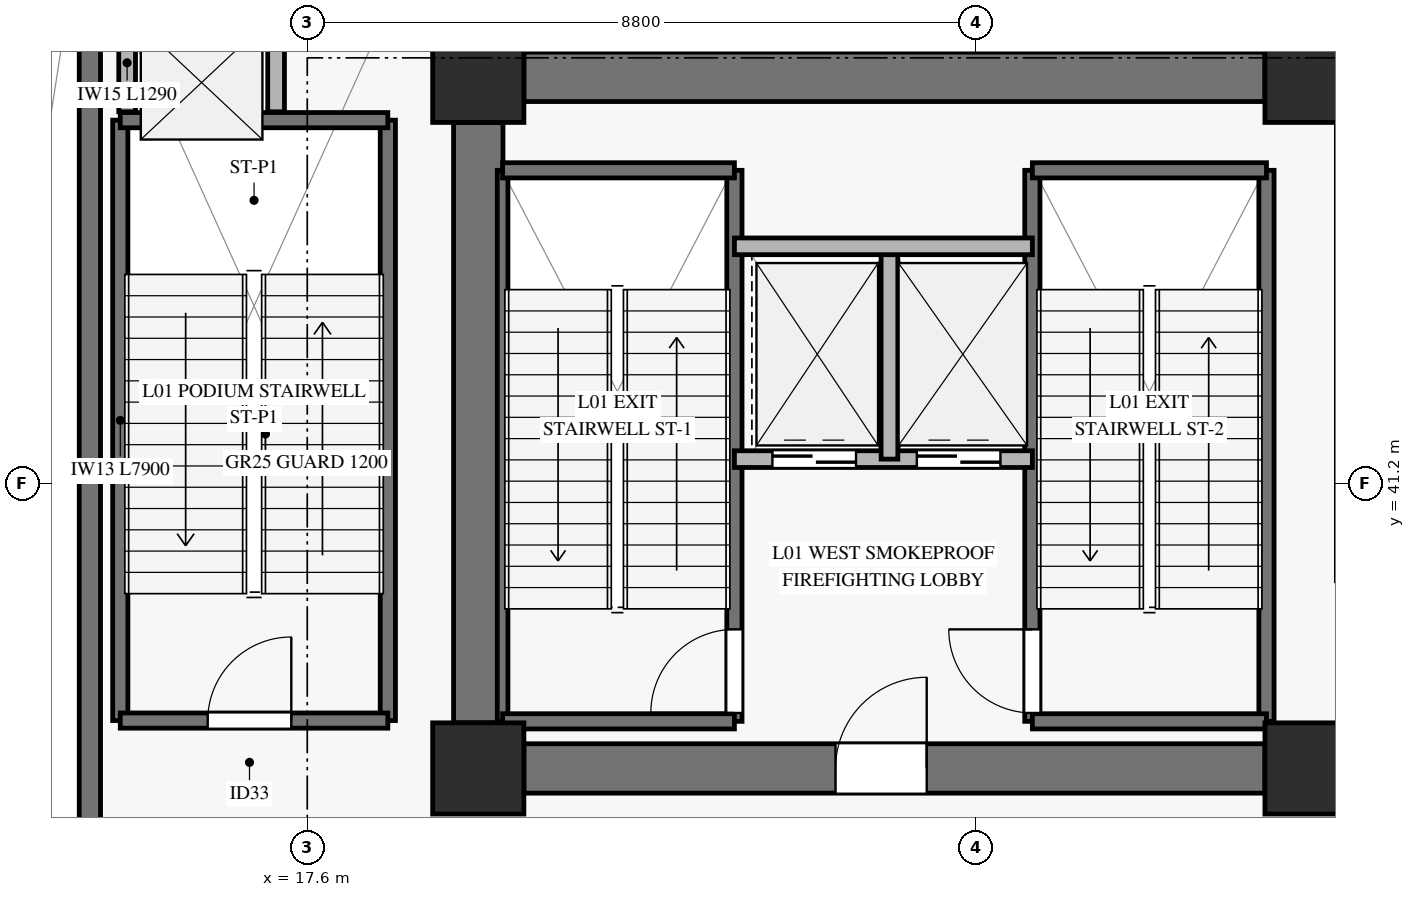
"""IFC4 building model, lengths in metres.
Left out: names, types, materials, properties, quantities, classifications, styles, units other than length and angle.
Written with IfcOpenShell. Run it as: python <this file> out.ifc"""

import sys

from ifc_helpers import new_model, si_unit, direction, frame, frame_2d, origin, origin_2d, place, context, subcontext, project, spatial, rectangle, extrude, source, transform, mapped, element, fill, save


model = new_model("IFC4")
c1 = context("Model", 3, precision=1e-05, world=origin(), true_north=direction((0.0, 1.0)))
c2 = subcontext(c1, "Body", "Model", "MODEL_VIEW")
j1 = project(units=[si_unit("LENGTHUNIT", "METRE"), si_unit("PLANEANGLEUNIT", "RADIAN")], contexts=[c1])
p1 = place(None, origin())
s1 = spatial("IfcSite", under=j1, at=p1, CompositionType="ELEMENT")
p2 = place(p1, origin())
s2 = spatial("IfcBuilding", under=s1, at=p2, CompositionType="ELEMENT")
p3 = place(p2, origin())
s3 = spatial("IfcBuildingStorey", under=s2, at=p3, CompositionType="ELEMENT", Elevation=0.0)
m1 = source(origin(), c2, "Body", "SweptSolid", [
    extrude(rectangle(XDim=1.2, YDim=1.2, at=origin_2d()), origin(), (0.0, 0.0, 1.0), 5.34),
])
for number, where, z_axis, x_axis in (
    (1, (19.85, 37.45, 0.0), (0.0, 0.0, 1.0), (1.0, 0.0, 0.0)),
    (2, (19.85, 46.55, 0.0), (0.0, 0.0, 1.0), (1.0, 0.0, 0.0)),
    (3, (30.8, 37.45, 0.0), (0.0, 0.0, 1.0), (1.0, 0.0, 0.0)),
    (4, (30.8, 46.55, 0.0), (0.0, 0.0, 1.0), (1.0, 0.0, 0.0)),
):
    element("IfcColumn", number, at=place(p3, frame(where, z_axis=z_axis, x_axis=x_axis)), inside=s3, PredefinedType="PILASTER", context=c2, shape_type="MappedRepresentation", body=[
        mapped(m1, transform((0.0, 0.0, 0.0), x_axis=(1.0, 0.0, 0.0), y_axis=(0.0, 1.0, 0.0), z_axis=(0.0, 0.0, 1.0), scale=1.0)),
    ])
p4 = place(p3, frame((20.45, 46.55, 0.0), z_axis=(0.0, 0.0, 1.0), x_axis=(1.0, 0.0, 0.0)))
e5 = element("IfcWall", 5, at=p4, inside=s3, PredefinedType="SHEAR", context=c2, shape_type="SweptSolid", body=[
    extrude(rectangle(XDim=9.75, YDim=0.65, at=frame_2d((4.875, 0.0))), origin(), (0.0, 0.0, 1.0), 5.34),
])
p5 = place(p3, frame((20.45, 37.45, 0.0), z_axis=(0.0, 0.0, 1.0), x_axis=(1.0, 0.0, 0.0)))
e6 = element("IfcWall", 6, at=p5, inside=s3, PredefinedType="SHEAR", context=c2, shape_type="SweptSolid", body=[
    extrude(rectangle(XDim=9.75, YDim=0.65, at=frame_2d((4.875, 0.0))), origin(), (0.0, 0.0, 1.0), 5.34),
])
p6 = place(p5, frame((4.1, 0.0, 0.0)))
e7 = element("IfcOpeningElement", 7, at=p6, cuts=e6, PredefinedType="OPENING", context=c2, shape_type="SweptSolid", body=[
    extrude(rectangle(XDim=1.2, YDim=2.15, at=frame_2d((0.6, 1.075))), frame((0.0, 0.335, 0.0), z_axis=(0.0, -1.0, 0.0), x_axis=(1.0, 0.0, 0.0)), (0.0, 0.0, 1.0), 0.67),
])
p7 = place(p3, frame((19.85, 38.05, 0.0), z_axis=(0.0, 0.0, 1.0), x_axis=(0.0, 1.0, 0.0)))
e8 = element("IfcWall", 8, at=p7, inside=s3, PredefinedType="SHEAR", context=c2, shape_type="SweptSolid", body=[
    extrude(rectangle(XDim=7.9, YDim=0.65, at=frame_2d((3.95, 0.0))), origin(), (0.0, 0.0, 1.0), 5.34),
])
p8 = place(p3, frame((14.74, 6.76, 0.0), z_axis=(0.0, 0.0, 1.0), x_axis=(0.0, 1.0, 0.0)))
e9 = element("IfcWall", 9, at=p8, inside=s3, PredefinedType="SOLIDWALL", context=c2, shape_type="SweptSolid", body=[
    extrude(rectangle(XDim=41.7, YDim=0.28, at=frame_2d((20.85, 0.0))), origin(), (0.0, 0.0, 1.0), 4.35),
])
p9 = place(p3, frame((20.17, 38.07, 0.0), z_axis=(0.0, 0.0, 1.0), x_axis=(0.0, 1.0, 0.0)))
e10 = element("IfcWall", 10, at=p9, inside=s3, PredefinedType="SOLIDWALL", context=c2, shape_type="SweptSolid", body=[
    extrude(rectangle(XDim=7.25, YDim=0.14, at=frame_2d((3.625, 0.0))), origin(), (0.0, 0.0, 1.0), 5.6),
])
p10 = place(p3, frame((23.22, 38.07, 0.0), z_axis=(0.0, 0.0, 1.0), x_axis=(0.0, 1.0, 0.0)))
e11 = element("IfcWall", 11, at=p10, inside=s3, PredefinedType="SOLIDWALL", context=c2, shape_type="SweptSolid", body=[
    extrude(rectangle(XDim=7.25, YDim=0.2, at=frame_2d((3.625, 0.0))), origin(), (0.0, 0.0, 1.0), 5.6),
])
p11 = place(p10, frame((0.11, 0.0, 0.0)))
e12 = element("IfcOpeningElement", 12, at=p11, cuts=e11, PredefinedType="OPENING", context=c2, shape_type="SweptSolid", body=[
    extrude(rectangle(XDim=1.1, YDim=2.15, at=frame_2d((0.55, 1.075))), frame((0.0, 0.11, 0.0), z_axis=(0.0, -1.0, 0.0), x_axis=(1.0, 0.0, 0.0)), (0.0, 0.0, 1.0), 0.22),
])
for number, where, z_axis, x_axis in (
    (13, (20.17, 45.32, 0.0), (0.0, 0.0, 1.0), (1.0, 0.0, 0.0)),
    (14, (20.17, 38.07, 0.0), (0.0, 0.0, 1.0), (1.0, 0.0, 0.0)),
):
    element("IfcWall", number, at=place(p3, frame(where, z_axis=z_axis, x_axis=x_axis)), inside=s3, PredefinedType="SOLIDWALL", context=c2, shape_type="SweptSolid", body=[
        extrude(rectangle(XDim=3.05, YDim=0.2, at=frame_2d((1.525, 0.0))), origin(), (0.0, 0.0, 1.0), 5.6),
    ])
p12 = place(p3, frame((27.14, 38.07, 0.0), z_axis=(0.0, 0.0, 1.0), x_axis=(0.0, 1.0, 0.0)))
e15 = element("IfcWall", 15, at=p12, inside=s3, PredefinedType="SOLIDWALL", context=c2, shape_type="SweptSolid", body=[
    extrude(rectangle(XDim=7.25, YDim=0.2, at=frame_2d((3.625, 0.0))), origin(), (0.0, 0.0, 1.0), 5.6),
])
p13 = place(p12, frame((0.11, 0.0, 0.0)))
e16 = element("IfcOpeningElement", 16, at=p13, cuts=e15, PredefinedType="OPENING", context=c2, shape_type="SweptSolid", body=[
    extrude(rectangle(XDim=1.1, YDim=2.15, at=frame_2d((0.55, 1.075))), frame((0.0, 0.11, 0.0), z_axis=(0.0, -1.0, 0.0), x_axis=(1.0, 0.0, 0.0)), (0.0, 0.0, 1.0), 0.22),
])
p14 = place(p3, frame((30.22, 38.07, 0.0), z_axis=(0.0, 0.0, 1.0), x_axis=(0.0, 1.0, 0.0)))
e17 = element("IfcWall", 17, at=p14, inside=s3, PredefinedType="SOLIDWALL", context=c2, shape_type="SweptSolid", body=[
    extrude(rectangle(XDim=7.25, YDim=0.2, at=frame_2d((3.625, 0.0))), origin(), (0.0, 0.0, 1.0), 5.6),
])
for number, where, z_axis, x_axis in (
    (18, (27.14, 45.32, 0.0), (0.0, 0.0, 1.0), (1.0, 0.0, 0.0)),
    (19, (27.14, 38.07, 0.0), (0.0, 0.0, 1.0), (1.0, 0.0, 0.0)),
):
    element("IfcWall", number, at=place(p3, frame(where, z_axis=z_axis, x_axis=x_axis)), inside=s3, PredefinedType="SOLIDWALL", context=c2, shape_type="SweptSolid", body=[
        extrude(rectangle(XDim=3.08, YDim=0.2, at=frame_2d((1.54, 0.0))), origin(), (0.0, 0.0, 1.0), 5.6),
    ])
p15 = place(p3, frame((23.22, 41.52, 0.0), z_axis=(0.0, 0.0, 1.0), x_axis=(1.0, 0.0, 0.0)))
e20 = element("IfcWall", 20, at=p15, inside=s3, PredefinedType="SOLIDWALL", context=c2, shape_type="SweptSolid", body=[
    extrude(rectangle(XDim=3.92, YDim=0.22, at=frame_2d((1.96, 0.0))), origin(), (0.0, 0.0, 1.0), 5.34),
])
p16 = place(p15, frame((0.5, 0.0, 0.0)))
e21 = element("IfcOpeningElement", 21, at=p16, cuts=e20, PredefinedType="OPENING", context=c2, shape_type="SweptSolid", body=[
    extrude(rectangle(XDim=1.1, YDim=2.2, at=frame_2d((0.55, 1.1))), frame((0.0, 0.12, 0.0), z_axis=(0.0, -1.0, 0.0), x_axis=(1.0, 0.0, 0.0)), (0.0, 0.0, 1.0), 0.24),
])
p17 = place(p15, frame((2.4, 0.0, 0.0)))
e22 = element("IfcOpeningElement", 22, at=p17, cuts=e20, PredefinedType="OPENING", context=c2, shape_type="SweptSolid", body=[
    extrude(rectangle(XDim=1.1, YDim=2.2, at=frame_2d((0.55, 1.1))), frame((0.0, 0.12, 0.0), z_axis=(0.0, -1.0, 0.0), x_axis=(1.0, 0.0, 0.0)), (0.0, 0.0, 1.0), 0.24),
])
p18 = place(p3, frame((25.26, 41.52, 0.0), z_axis=(0.0, 0.0, 1.0), x_axis=(0.0, 1.0, 0.0)))
e23 = element("IfcWall", 23, at=p18, inside=s3, PredefinedType="SOLIDWALL", context=c2, shape_type="SweptSolid", body=[
    extrude(rectangle(XDim=2.8, YDim=0.22, at=frame_2d((1.4, 0.0))), origin(), (0.0, 0.0, 1.0), 5.34),
])
p19 = place(p3, frame((23.22, 44.32, 0.0), z_axis=(0.0, 0.0, 1.0), x_axis=(1.0, 0.0, 0.0)))
e24 = element("IfcWall", 24, at=p19, inside=s3, PredefinedType="SOLIDWALL", context=c2, shape_type="SweptSolid", body=[
    extrude(rectangle(XDim=3.92, YDim=0.22, at=frame_2d((1.96, 0.0))), origin(), (0.0, 0.0, 1.0), 5.34),
])
for number, where, z_axis, x_axis in (
    (25, (15.14, 38.08, 0.0), (0.0, 0.0, 1.0), (0.0, 1.0, 0.0)),
    (26, (18.66, 38.08, 0.0), (0.0, 0.0, 1.0), (0.0, 1.0, 0.0)),
):
    element("IfcWall", number, at=place(p3, frame(where, z_axis=z_axis, x_axis=x_axis)), inside=s3, PredefinedType="SOLIDWALL", context=c2, shape_type="SweptSolid", body=[
        extrude(rectangle(XDim=7.9, YDim=0.2, at=frame_2d((3.95, 0.0))), origin(), (0.0, 0.0, 1.0), 5.6),
    ])
p20 = place(p3, frame((15.14, 45.98, 0.0), z_axis=(0.0, 0.0, 1.0), x_axis=(1.0, 0.0, 0.0)))
e27 = element("IfcWall", 27, at=p20, inside=s3, PredefinedType="SOLIDWALL", context=c2, shape_type="SweptSolid", body=[
    extrude(rectangle(XDim=3.52, YDim=0.2, at=frame_2d((1.76, 0.0))), origin(), (0.0, 0.0, 1.0), 5.6),
])
p21 = place(p3, frame((15.14, 38.08, 0.0), z_axis=(0.0, 0.0, 1.0), x_axis=(1.0, 0.0, 0.0)))
e28 = element("IfcWall", 28, at=p21, inside=s3, PredefinedType="SOLIDWALL", context=c2, shape_type="SweptSolid", body=[
    extrude(rectangle(XDim=3.52, YDim=0.2, at=frame_2d((1.76, 0.0))), origin(), (0.0, 0.0, 1.0), 5.6),
])
p22 = place(p21, frame((1.15, 0.0, 0.0)))
e29 = element("IfcOpeningElement", 29, at=p22, cuts=e28, PredefinedType="OPENING", context=c2, shape_type="SweptSolid", body=[
    extrude(rectangle(XDim=1.1, YDim=2.15, at=frame_2d((0.55, 1.075))), frame((0.0, 0.11, 0.0), z_axis=(0.0, -1.0, 0.0), x_axis=(1.0, 0.0, 0.0)), (0.0, 0.0, 1.0), 0.22),
])
for number, where, z_axis, x_axis in (
    (30, (15.23, 46.09, 0.0), (0.0, 0.0, 1.0), (0.0, 1.0, 0.0)),
    (31, (17.19, 46.09, 0.0), (0.0, 0.0, 1.0), (0.0, 1.0, 0.0)),
):
    element("IfcWall", number, at=place(p3, frame(where, z_axis=z_axis, x_axis=x_axis)), inside=s3, PredefinedType="SOLIDWALL", context=c2, shape_type="SweptSolid", body=[
        extrude(rectangle(XDim=1.29, YDim=0.22, at=frame_2d((0.645, 0.0))), origin(), (0.0, 0.0, 1.0), 5.34),
    ])
m2 = source(origin(), c2, "Body", "SweptSolid", [
    extrude(rectangle(XDim=1.1, YDim=2.15, at=frame_2d((0.55, 1.075))), frame((0.0, 0.025, 0.0), z_axis=(0.0, -1.0, 0.0), x_axis=(1.0, 0.0, 0.0)), (0.0, 0.0, 1.0), 0.05),
])
p23 = place(p11, origin())
e32 = element("IfcDoor", 32, at=p23, inside=s3, OperationType="SINGLE_SWING_LEFT", PredefinedType="DOOR", context=c2, shape_type="MappedRepresentation", body=[
    mapped(m2, transform((0.0, 0.0, 0.0), x_axis=(1.0, 0.0, 0.0), y_axis=(0.0, 1.0, 0.0), z_axis=(0.0, 0.0, 1.0), scale=1.0)),
])
fill(e12, e32)
p24 = place(p13, origin())
e33 = element("IfcDoor", 33, at=p24, inside=s3, OperationType="SINGLE_SWING_RIGHT", PredefinedType="DOOR", context=c2, shape_type="MappedRepresentation", body=[
    mapped(m2, transform((0.0, 0.0, 0.0), x_axis=(1.0, 0.0, 0.0), y_axis=(0.0, 1.0, 0.0), z_axis=(0.0, 0.0, 1.0), scale=1.0)),
])
fill(e16, e33)
m3 = source(origin(), c2, "Body", "SweptSolid", [
    extrude(rectangle(XDim=1.1, YDim=2.2, at=frame_2d((0.55, 1.1))), frame((0.0, 0.025, 0.0), z_axis=(0.0, -1.0, 0.0), x_axis=(1.0, 0.0, 0.0)), (0.0, 0.0, 1.0), 0.05),
])
p25 = place(p16, origin())
e34 = element("IfcDoor", 34, at=p25, inside=s3, OperationType="SLIDING_TO_LEFT", PredefinedType="DOOR", context=c2, shape_type="MappedRepresentation", body=[
    mapped(m3, transform((0.0, 0.0, 0.0), x_axis=(1.0, 0.0, 0.0), y_axis=(0.0, 1.0, 0.0), z_axis=(0.0, 0.0, 1.0), scale=1.0)),
])
fill(e21, e34)
p26 = place(p17, origin())
e35 = element("IfcDoor", 35, at=p26, inside=s3, OperationType="SLIDING_TO_LEFT", PredefinedType="DOOR", context=c2, shape_type="MappedRepresentation", body=[
    mapped(m3, transform((0.0, 0.0, 0.0), x_axis=(1.0, 0.0, 0.0), y_axis=(0.0, 1.0, 0.0), z_axis=(0.0, 0.0, 1.0), scale=1.0)),
])
fill(e22, e35)
m4 = source(origin(), c2, "Body", "SweptSolid", [
    extrude(rectangle(XDim=1.2, YDim=2.15, at=frame_2d((0.6, 1.075))), frame((0.0, 0.025, 0.0), z_axis=(0.0, -1.0, 0.0), x_axis=(1.0, 0.0, 0.0)), (0.0, 0.0, 1.0), 0.05),
])
p27 = place(p6, origin())
e36 = element("IfcDoor", 36, at=p27, inside=s3, OperationType="SINGLE_SWING_RIGHT", PredefinedType="DOOR", context=c2, shape_type="MappedRepresentation", body=[
    mapped(m4, transform((0.0, 0.0, 0.0), x_axis=(1.0, 0.0, 0.0), y_axis=(0.0, 1.0, 0.0), z_axis=(0.0, 0.0, 1.0), scale=1.0)),
])
fill(e7, e36)
p28 = place(p22, origin())
e37 = element("IfcDoor", 37, at=p28, inside=s3, OperationType="SINGLE_SWING_RIGHT", PredefinedType="DOOR", context=c2, shape_type="MappedRepresentation", body=[
    mapped(m2, transform((0.0, 0.0, 0.0), x_axis=(1.0, 0.0, 0.0), y_axis=(0.0, 1.0, 0.0), z_axis=(0.0, 0.0, 1.0), scale=1.0)),
])
fill(e29, e37)
save(model, sys.argv[1])
